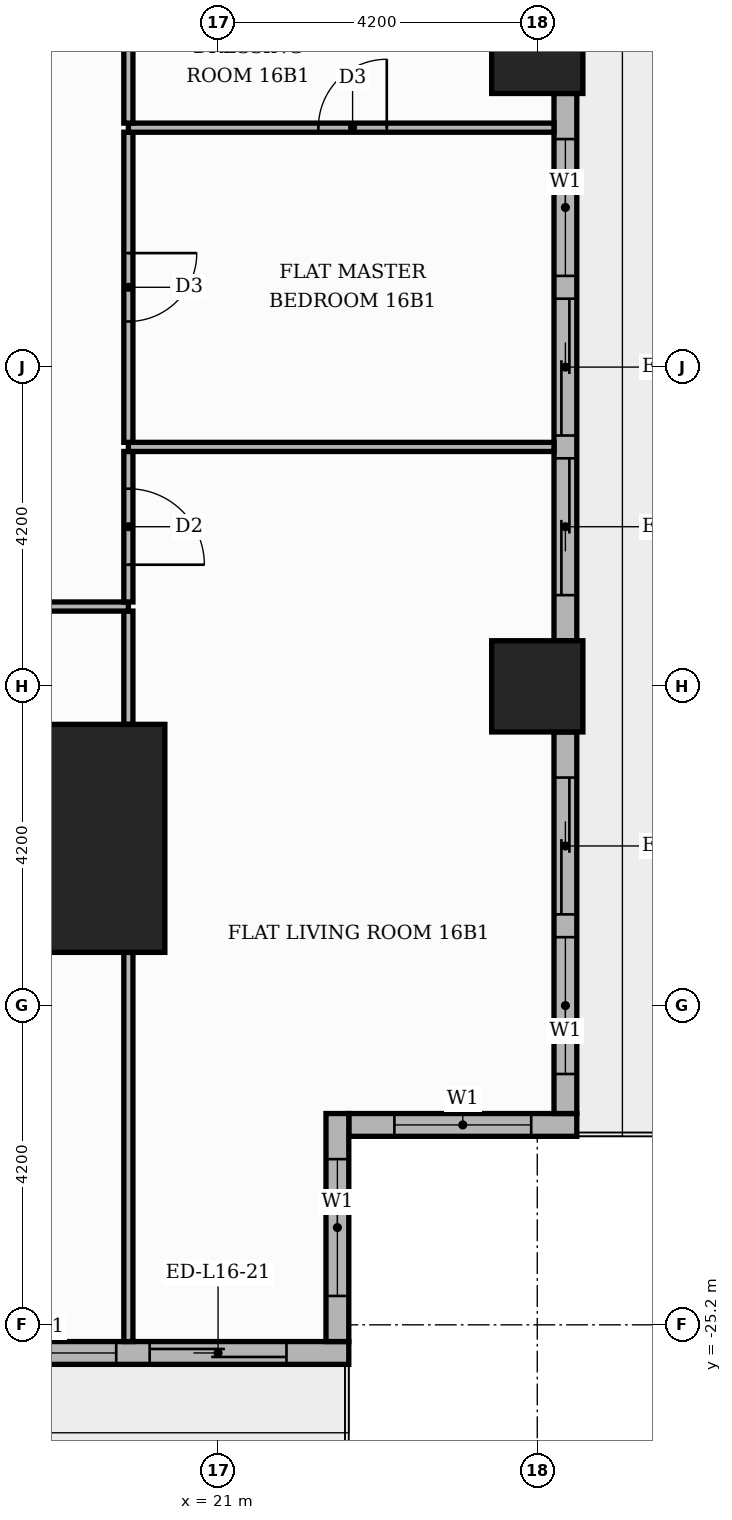
"""IFC4 building model, lengths in metres.
Left out: names, types, materials, properties, quantities, classifications, styles, units other than length and angle.
Written with IfcOpenShell. Run it as: python <this file> out.ifc"""

import sys

from ifc_helpers import new_model, si_unit, direction, frame, frame_2d, origin, origin_2d, place, context, subcontext, project, spatial, rectangle, extrude, element, fill, save


model = new_model("IFC4")
c1 = context("Model", 3, precision=1e-05, world=origin(), true_north=direction((0.0, 1.0)))
c2 = subcontext(c1, "Body", "Model", "MODEL_VIEW")
j1 = project(units=[si_unit("LENGTHUNIT", "METRE"), si_unit("PLANEANGLEUNIT", "RADIAN")], contexts=[c1])
p1 = place(None, origin())
s1 = spatial("IfcSite", under=j1, at=p1, CompositionType="ELEMENT")
p2 = place(p1, origin())
s2 = spatial("IfcBuilding", under=s1, at=p2, CompositionType="ELEMENT")
p3 = place(p2, frame((0.0, 0.0, 69.9)))
s3 = spatial("IfcBuildingStorey", under=s2, at=p3, CompositionType="ELEMENT", Elevation=69.9)
p4 = place(p3, frame((18.8, -18.8, 0.0), z_axis=(0.0, 0.0, 1.0), x_axis=(1.0, 0.0, 0.0)))
e1 = element("IfcColumn", 1, at=p4, inside=s3, PredefinedType="COLUMN", context=c2, shape_type="SweptSolid", body=[
    extrude(rectangle(XDim=3.0, YDim=3.0, at=origin_2d()), origin(), (0.0, 0.0, 1.0), 3.9),
])
for number, where, z_axis, x_axis in (
    (2, (25.2, -8.4, 0.0), (0.0, 0.0, 1.0), (1.0, 0.0, 0.0)),
    (3, (25.2, -16.8, 0.0), (0.0, 0.0, 1.0), (1.0, 0.0, 0.0)),
):
    element("IfcColumn", number, at=place(p3, frame(where, z_axis=z_axis, x_axis=x_axis)), inside=s3, PredefinedType="COLUMN", context=c2, shape_type="SweptSolid", body=[
        extrude(rectangle(XDim=1.2, YDim=1.2, at=origin_2d()), origin(), (0.0, 0.0, 1.0), 3.9),
    ])
p5 = place(p3, frame((22.72, -22.57, 0.0), z_axis=(0.0, 0.0, 1.0), x_axis=(1.0, 0.0, 0.0)))
e4 = element("IfcWall", 4, at=p5, inside=s3, PredefinedType="STANDARD", context=c2, shape_type="SweptSolid", body=[
    extrude(rectangle(XDim=3.0, YDim=0.3, at=frame_2d((1.5, 0.0))), origin(), (0.0, 0.0, 1.0), 3.4),
])
p6 = place(p5, frame((0.6, 0.0, 0.9)))
e5 = element("IfcOpeningElement", 5, at=p6, cuts=e4, PredefinedType="OPENING", context=c2, shape_type="SweptSolid", body=[
    extrude(rectangle(XDim=1.8, YDim=2.1, at=frame_2d((0.9, 1.05))), frame((0.0, 0.16, 0.0), z_axis=(0.0, -1.0, 0.0), x_axis=(1.0, 0.0, 0.0)), (0.0, 0.0, 1.0), 0.32),
])
p7 = place(p3, frame((25.57, -22.42, 0.0), z_axis=(0.0, 0.0, 1.0), x_axis=(0.0, 1.0, 0.0)))
e6 = element("IfcWall", 6, at=p7, inside=s3, PredefinedType="STANDARD", context=c2, shape_type="SweptSolid", body=[
    extrude(rectangle(XDim=5.02, YDim=0.3, at=frame_2d((2.51, 0.0))), origin(), (0.0, 0.0, 1.0), 3.4),
])
p8 = place(p7, frame((0.52, 0.0, 0.9)))
e7 = element("IfcOpeningElement", 7, at=p8, cuts=e6, PredefinedType="OPENING", context=c2, shape_type="SweptSolid", body=[
    extrude(rectangle(XDim=1.8, YDim=2.1, at=frame_2d((0.9, 1.05))), frame((0.0, 0.16, 0.0), z_axis=(0.0, -1.0, 0.0), x_axis=(1.0, 0.0, 0.0)), (0.0, 0.0, 1.0), 0.32),
])
p9 = place(p7, frame((2.62, 0.0, 0.0)))
e8 = element("IfcOpeningElement", 8, at=p9, cuts=e6, PredefinedType="OPENING", context=c2, shape_type="SweptSolid", body=[
    extrude(rectangle(XDim=1.8, YDim=2.4, at=frame_2d((0.9, 1.2))), frame((0.0, 0.16, 0.0), z_axis=(0.0, -1.0, 0.0), x_axis=(1.0, 0.0, 0.0)), (0.0, 0.0, 1.0), 0.32),
])
p10 = place(p3, frame((25.57, -16.2, 0.0), z_axis=(0.0, 0.0, 1.0), x_axis=(0.0, 1.0, 0.0)))
e9 = element("IfcWall", 9, at=p10, inside=s3, PredefinedType="STANDARD", context=c2, shape_type="SweptSolid", body=[
    extrude(rectangle(XDim=7.2, YDim=0.3, at=frame_2d((3.6, 0.0))), origin(), (0.0, 0.0, 1.0), 3.4),
])
p11 = place(p10, frame((0.6, 0.0, 0.0)))
e10 = element("IfcOpeningElement", 10, at=p11, cuts=e9, PredefinedType="OPENING", context=c2, shape_type="SweptSolid", body=[
    extrude(rectangle(XDim=1.8, YDim=2.4, at=frame_2d((0.9, 1.2))), frame((0.0, 0.16, 0.0), z_axis=(0.0, -1.0, 0.0), x_axis=(1.0, 0.0, 0.0)), (0.0, 0.0, 1.0), 0.32),
])
p12 = place(p10, frame((2.7, 0.0, 0.0)))
e11 = element("IfcOpeningElement", 11, at=p12, cuts=e9, PredefinedType="OPENING", context=c2, shape_type="SweptSolid", body=[
    extrude(rectangle(XDim=1.8, YDim=2.4, at=frame_2d((0.9, 1.2))), frame((0.0, 0.16, 0.0), z_axis=(0.0, -1.0, 0.0), x_axis=(1.0, 0.0, 0.0)), (0.0, 0.0, 1.0), 0.32),
])
p13 = place(p10, frame((4.8, 0.0, 0.9)))
e12 = element("IfcOpeningElement", 12, at=p13, cuts=e9, PredefinedType="OPENING", context=c2, shape_type="SweptSolid", body=[
    extrude(rectangle(XDim=1.8, YDim=2.1, at=frame_2d((0.9, 1.05))), frame((0.0, 0.16, 0.0), z_axis=(0.0, -1.0, 0.0), x_axis=(1.0, 0.0, 0.0)), (0.0, 0.0, 1.0), 0.32),
])
p14 = place(p3, frame((17.4, -25.57, 0.0), z_axis=(0.0, 0.0, 1.0), x_axis=(1.0, 0.0, 0.0)))
e13 = element("IfcWall", 13, at=p14, inside=s3, PredefinedType="STANDARD", context=c2, shape_type="SweptSolid", body=[
    extrude(rectangle(XDim=5.32, YDim=0.3, at=frame_2d((2.66, 0.0))), origin(), (0.0, 0.0, 1.0), 3.4),
])
p15 = place(p14, frame((2.7, 0.0, 0.0)))
e14 = element("IfcOpeningElement", 14, at=p15, cuts=e13, PredefinedType="OPENING", context=c2, shape_type="SweptSolid", body=[
    extrude(rectangle(XDim=1.8, YDim=2.4, at=frame_2d((0.9, 1.2))), frame((0.0, 0.16, 0.0), z_axis=(0.0, -1.0, 0.0), x_axis=(1.0, 0.0, 0.0)), (0.0, 0.0, 1.0), 0.32),
])
p16 = place(p14, frame((0.46, 0.0, 0.9)))
e15 = element("IfcOpeningElement", 15, at=p16, cuts=e13, PredefinedType="OPENING", context=c2, shape_type="SweptSolid", body=[
    extrude(rectangle(XDim=1.8, YDim=2.1, at=frame_2d((0.9, 1.05))), frame((0.0, 0.16, 0.0), z_axis=(0.0, -1.0, 0.0), x_axis=(1.0, 0.0, 0.0)), (0.0, 0.0, 1.0), 0.32),
])
p17 = place(p3, frame((22.57, -25.42, 0.0), z_axis=(0.0, 0.0, 1.0), x_axis=(0.0, 1.0, 0.0)))
e16 = element("IfcWall", 16, at=p17, inside=s3, PredefinedType="STANDARD", context=c2, shape_type="SweptSolid", body=[
    extrude(rectangle(XDim=3.0, YDim=0.3, at=frame_2d((1.5, 0.0))), origin(), (0.0, 0.0, 1.0), 3.4),
])
p18 = place(p17, frame((0.6, 0.0, 0.9)))
e17 = element("IfcOpeningElement", 17, at=p18, cuts=e16, PredefinedType="OPENING", context=c2, shape_type="SweptSolid", body=[
    extrude(rectangle(XDim=1.8, YDim=2.1, at=frame_2d((0.9, 1.05))), frame((0.0, 0.16, 0.0), z_axis=(0.0, -1.0, 0.0), x_axis=(1.0, 0.0, 0.0)), (0.0, 0.0, 1.0), 0.32),
])
p19 = place(p3, frame((19.82, -25.42, 0.0), z_axis=(0.0, 0.0, 1.0), x_axis=(0.0, 1.0, 0.0)))
e18 = element("IfcWall", 18, at=p19, inside=s3, PredefinedType="PARTITIONING", context=c2, shape_type="SweptSolid", body=[
    extrude(rectangle(XDim=5.12, YDim=0.12, at=frame_2d((2.56, 0.0))), origin(), (0.0, 0.0, 1.0), 3.4),
])
p20 = place(p3, frame((19.82, -17.3, 0.0), z_axis=(0.0, 0.0, 1.0), x_axis=(0.0, 1.0, 0.0)))
e19 = element("IfcWall", 19, at=p20, inside=s3, PredefinedType="PARTITIONING", context=c2, shape_type="SweptSolid", body=[
    extrude(rectangle(XDim=1.49, YDim=0.12, at=frame_2d((0.745, 0.0))), origin(), (0.0, 0.0, 1.0), 3.4),
])
p21 = place(p3, frame((13.75, -15.75, 0.0), z_axis=(0.0, 0.0, 1.0), x_axis=(1.0, 0.0, 0.0)))
e20 = element("IfcWall", 20, at=p21, inside=s3, PredefinedType="PARTITIONING", context=c2, shape_type="SweptSolid", body=[
    extrude(rectangle(XDim=6.07, YDim=0.12, at=frame_2d((3.035, 0.0))), origin(), (0.0, 0.0, 1.0), 3.4),
])
p22 = place(p21, frame((2.485, 0.0, 0.0)))
e21 = element("IfcOpeningElement", 21, at=p22, cuts=e20, PredefinedType="OPENING", context=c2, shape_type="SweptSolid", body=[
    extrude(rectangle(XDim=1.0, YDim=2.1, at=frame_2d((0.5, 1.05))), frame((0.0, 0.07, 0.0), z_axis=(0.0, -1.0, 0.0), x_axis=(1.0, 0.0, 0.0)), (0.0, 0.0, 1.0), 0.14),
])
p23 = place(p3, frame((19.82, -15.69, 0.0), z_axis=(0.0, 0.0, 1.0), x_axis=(0.0, 1.0, 0.0)))
e22 = element("IfcWall", 22, at=p23, inside=s3, PredefinedType="PARTITIONING", context=c2, shape_type="SweptSolid", body=[
    extrude(rectangle(XDim=1.98, YDim=0.12, at=frame_2d((0.99, 0.0))), origin(), (0.0, 0.0, 1.0), 3.4),
])
p24 = place(p23, frame((0.49, 0.0, 0.0)))
e23 = element("IfcOpeningElement", 23, at=p24, cuts=e22, PredefinedType="OPENING", context=c2, shape_type="SweptSolid", body=[
    extrude(rectangle(XDim=1.0, YDim=2.1, at=frame_2d((0.5, 1.05))), frame((0.0, 0.07, 0.0), z_axis=(0.0, -1.0, 0.0), x_axis=(1.0, 0.0, 0.0)), (0.0, 0.0, 1.0), 0.14),
])
p25 = place(p3, frame((19.82, -13.65, 0.0), z_axis=(0.0, 0.0, 1.0), x_axis=(1.0, 0.0, 0.0)))
e24 = element("IfcWall", 24, at=p25, inside=s3, PredefinedType="PARTITIONING", context=c2, shape_type="SweptSolid", body=[
    extrude(rectangle(XDim=5.6, YDim=0.12, at=frame_2d((2.8, 0.0))), origin(), (0.0, 0.0, 1.0), 3.4),
])
p26 = place(p3, frame((19.82, -13.59, 0.0), z_axis=(0.0, 0.0, 1.0), x_axis=(0.0, 1.0, 0.0)))
e25 = element("IfcWall", 25, at=p26, inside=s3, PredefinedType="PARTITIONING", context=c2, shape_type="SweptSolid", body=[
    extrude(rectangle(XDim=4.08, YDim=0.12, at=frame_2d((2.04, 0.0))), origin(), (0.0, 0.0, 1.0), 3.4),
])
p27 = place(p26, frame((1.59, 0.0, 0.0)))
e26 = element("IfcOpeningElement", 26, at=p27, cuts=e25, PredefinedType="OPENING", context=c2, shape_type="SweptSolid", body=[
    extrude(rectangle(XDim=0.9, YDim=2.1, at=frame_2d((0.45, 1.05))), frame((0.0, 0.07, 0.0), z_axis=(0.0, -1.0, 0.0), x_axis=(1.0, 0.0, 0.0)), (0.0, 0.0, 1.0), 0.14),
])
p28 = place(p3, frame((19.82, -9.45, 0.0), z_axis=(0.0, 0.0, 1.0), x_axis=(1.0, 0.0, 0.0)))
e27 = element("IfcWall", 27, at=p28, inside=s3, PredefinedType="PARTITIONING", context=c2, shape_type="SweptSolid", body=[
    extrude(rectangle(XDim=5.6, YDim=0.12, at=frame_2d((2.8, 0.0))), origin(), (0.0, 0.0, 1.0), 3.4),
])
p29 = place(p28, frame((2.5, 0.0, 0.0)))
e28 = element("IfcOpeningElement", 28, at=p29, cuts=e27, PredefinedType="OPENING", context=c2, shape_type="SweptSolid", body=[
    extrude(rectangle(XDim=0.9, YDim=2.1, at=frame_2d((0.45, 1.05))), frame((0.0, 0.07, 0.0), z_axis=(0.0, -1.0, 0.0), x_axis=(1.0, 0.0, 0.0)), (0.0, 0.0, 1.0), 0.14),
])
p30 = place(p3, frame((19.82, -9.39, 0.0), z_axis=(0.0, 0.0, 1.0), x_axis=(0.0, 1.0, 0.0)))
e29 = element("IfcWall", 29, at=p30, inside=s3, PredefinedType="PARTITIONING", context=c2, shape_type="SweptSolid", body=[
    extrude(rectangle(XDim=1.98, YDim=0.12, at=frame_2d((0.99, 0.0))), origin(), (0.0, 0.0, 1.0), 3.4),
])
p31 = place(p6, origin())
e30 = element("IfcWindow", 30, at=p31, inside=s3, PartitioningType="SINGLE_PANEL", PredefinedType="WINDOW", context=c2, shape_type="SweptSolid", body=[
    extrude(rectangle(XDim=1.8, YDim=2.1, at=frame_2d((0.9, 1.05))), frame((0.0, 0.03, 0.0), z_axis=(0.0, -1.0, 0.0), x_axis=(1.0, 0.0, 0.0)), (0.0, 0.0, 1.0), 0.06),
])
fill(e5, e30)
p32 = place(p8, origin())
e31 = element("IfcWindow", 31, at=p32, inside=s3, PartitioningType="SINGLE_PANEL", PredefinedType="WINDOW", context=c2, shape_type="SweptSolid", body=[
    extrude(rectangle(XDim=1.8, YDim=2.1, at=frame_2d((0.9, 1.05))), frame((0.0, 0.03, 0.0), z_axis=(0.0, -1.0, 0.0), x_axis=(1.0, 0.0, 0.0)), (0.0, 0.0, 1.0), 0.06),
])
fill(e7, e31)
p33 = place(p9, origin())
e32 = element("IfcDoor", 32, at=p33, inside=s3, OperationType="SLIDING_TO_RIGHT", PredefinedType="DOOR", context=c2, shape_type="SweptSolid", body=[
    extrude(rectangle(XDim=1.8, YDim=2.4, at=frame_2d((0.9, 1.2))), frame((0.0, 0.025, 0.0), z_axis=(0.0, -1.0, 0.0), x_axis=(1.0, 0.0, 0.0)), (0.0, 0.0, 1.0), 0.05),
])
fill(e8, e32)
p34 = place(p11, origin())
e33 = element("IfcDoor", 33, at=p34, inside=s3, OperationType="SLIDING_TO_LEFT", PredefinedType="DOOR", context=c2, shape_type="SweptSolid", body=[
    extrude(rectangle(XDim=1.8, YDim=2.4, at=frame_2d((0.9, 1.2))), frame((0.0, 0.025, 0.0), z_axis=(0.0, -1.0, 0.0), x_axis=(1.0, 0.0, 0.0)), (0.0, 0.0, 1.0), 0.05),
])
fill(e10, e33)
p35 = place(p12, origin())
e34 = element("IfcDoor", 34, at=p35, inside=s3, OperationType="SLIDING_TO_RIGHT", PredefinedType="DOOR", context=c2, shape_type="SweptSolid", body=[
    extrude(rectangle(XDim=1.8, YDim=2.4, at=frame_2d((0.9, 1.2))), frame((0.0, 0.025, 0.0), z_axis=(0.0, -1.0, 0.0), x_axis=(1.0, 0.0, 0.0)), (0.0, 0.0, 1.0), 0.05),
])
fill(e11, e34)
p36 = place(p13, origin())
e35 = element("IfcWindow", 35, at=p36, inside=s3, PartitioningType="SINGLE_PANEL", PredefinedType="WINDOW", context=c2, shape_type="SweptSolid", body=[
    extrude(rectangle(XDim=1.8, YDim=2.1, at=frame_2d((0.9, 1.05))), frame((0.0, 0.03, 0.0), z_axis=(0.0, -1.0, 0.0), x_axis=(1.0, 0.0, 0.0)), (0.0, 0.0, 1.0), 0.06),
])
fill(e12, e35)
p37 = place(p15, origin())
e36 = element("IfcDoor", 36, at=p37, inside=s3, OperationType="SLIDING_TO_LEFT", PredefinedType="DOOR", context=c2, shape_type="SweptSolid", body=[
    extrude(rectangle(XDim=1.8, YDim=2.4, at=frame_2d((0.9, 1.2))), frame((0.0, 0.025, 0.0), z_axis=(0.0, -1.0, 0.0), x_axis=(1.0, 0.0, 0.0)), (0.0, 0.0, 1.0), 0.05),
])
fill(e14, e36)
p38 = place(p16, origin())
e37 = element("IfcWindow", 37, at=p38, inside=s3, PartitioningType="SINGLE_PANEL", PredefinedType="WINDOW", context=c2, shape_type="SweptSolid", body=[
    extrude(rectangle(XDim=1.8, YDim=2.1, at=frame_2d((0.9, 1.05))), frame((0.0, 0.03, 0.0), z_axis=(0.0, -1.0, 0.0), x_axis=(1.0, 0.0, 0.0)), (0.0, 0.0, 1.0), 0.06),
])
fill(e15, e37)
p39 = place(p18, origin())
e38 = element("IfcWindow", 38, at=p39, inside=s3, PartitioningType="SINGLE_PANEL", PredefinedType="WINDOW", context=c2, shape_type="SweptSolid", body=[
    extrude(rectangle(XDim=1.8, YDim=2.1, at=frame_2d((0.9, 1.05))), frame((0.0, 0.03, 0.0), z_axis=(0.0, -1.0, 0.0), x_axis=(1.0, 0.0, 0.0)), (0.0, 0.0, 1.0), 0.06),
])
fill(e17, e38)
p40 = place(p24, frame((1.0, 0.0, 0.0), z_axis=(0.0, 0.0, 1.0), x_axis=(-1.0, 0.0, 0.0)))
e39 = element("IfcDoor", 39, at=p40, inside=s3, OperationType="SINGLE_SWING_LEFT", PredefinedType="DOOR", context=c2, shape_type="SweptSolid", body=[
    extrude(rectangle(XDim=1.0, YDim=2.1, at=frame_2d((0.5, 1.05))), frame((0.0, 0.025, 0.0), z_axis=(0.0, -1.0, 0.0), x_axis=(1.0, 0.0, 0.0)), (0.0, 0.0, 1.0), 0.05),
])
fill(e23, e39)
p41 = place(p27, frame((0.9, 0.0, 0.0), z_axis=(0.0, 0.0, 1.0), x_axis=(-1.0, 0.0, 0.0)))
e40 = element("IfcDoor", 40, at=p41, inside=s3, OperationType="SINGLE_SWING_RIGHT", PredefinedType="DOOR", context=c2, shape_type="SweptSolid", body=[
    extrude(rectangle(XDim=0.9, YDim=2.1, at=frame_2d((0.45, 1.05))), frame((0.0, 0.025, 0.0), z_axis=(0.0, -1.0, 0.0), x_axis=(1.0, 0.0, 0.0)), (0.0, 0.0, 1.0), 0.05),
])
fill(e26, e40)
p42 = place(p29, origin())
e41 = element("IfcDoor", 41, at=p42, inside=s3, OperationType="SINGLE_SWING_RIGHT", PredefinedType="DOOR", context=c2, shape_type="SweptSolid", body=[
    extrude(rectangle(XDim=0.9, YDim=2.1, at=frame_2d((0.45, 1.05))), frame((0.0, 0.025, 0.0), z_axis=(0.0, -1.0, 0.0), x_axis=(1.0, 0.0, 0.0)), (0.0, 0.0, 1.0), 0.05),
])
fill(e28, e41)
save(model, sys.argv[1])
